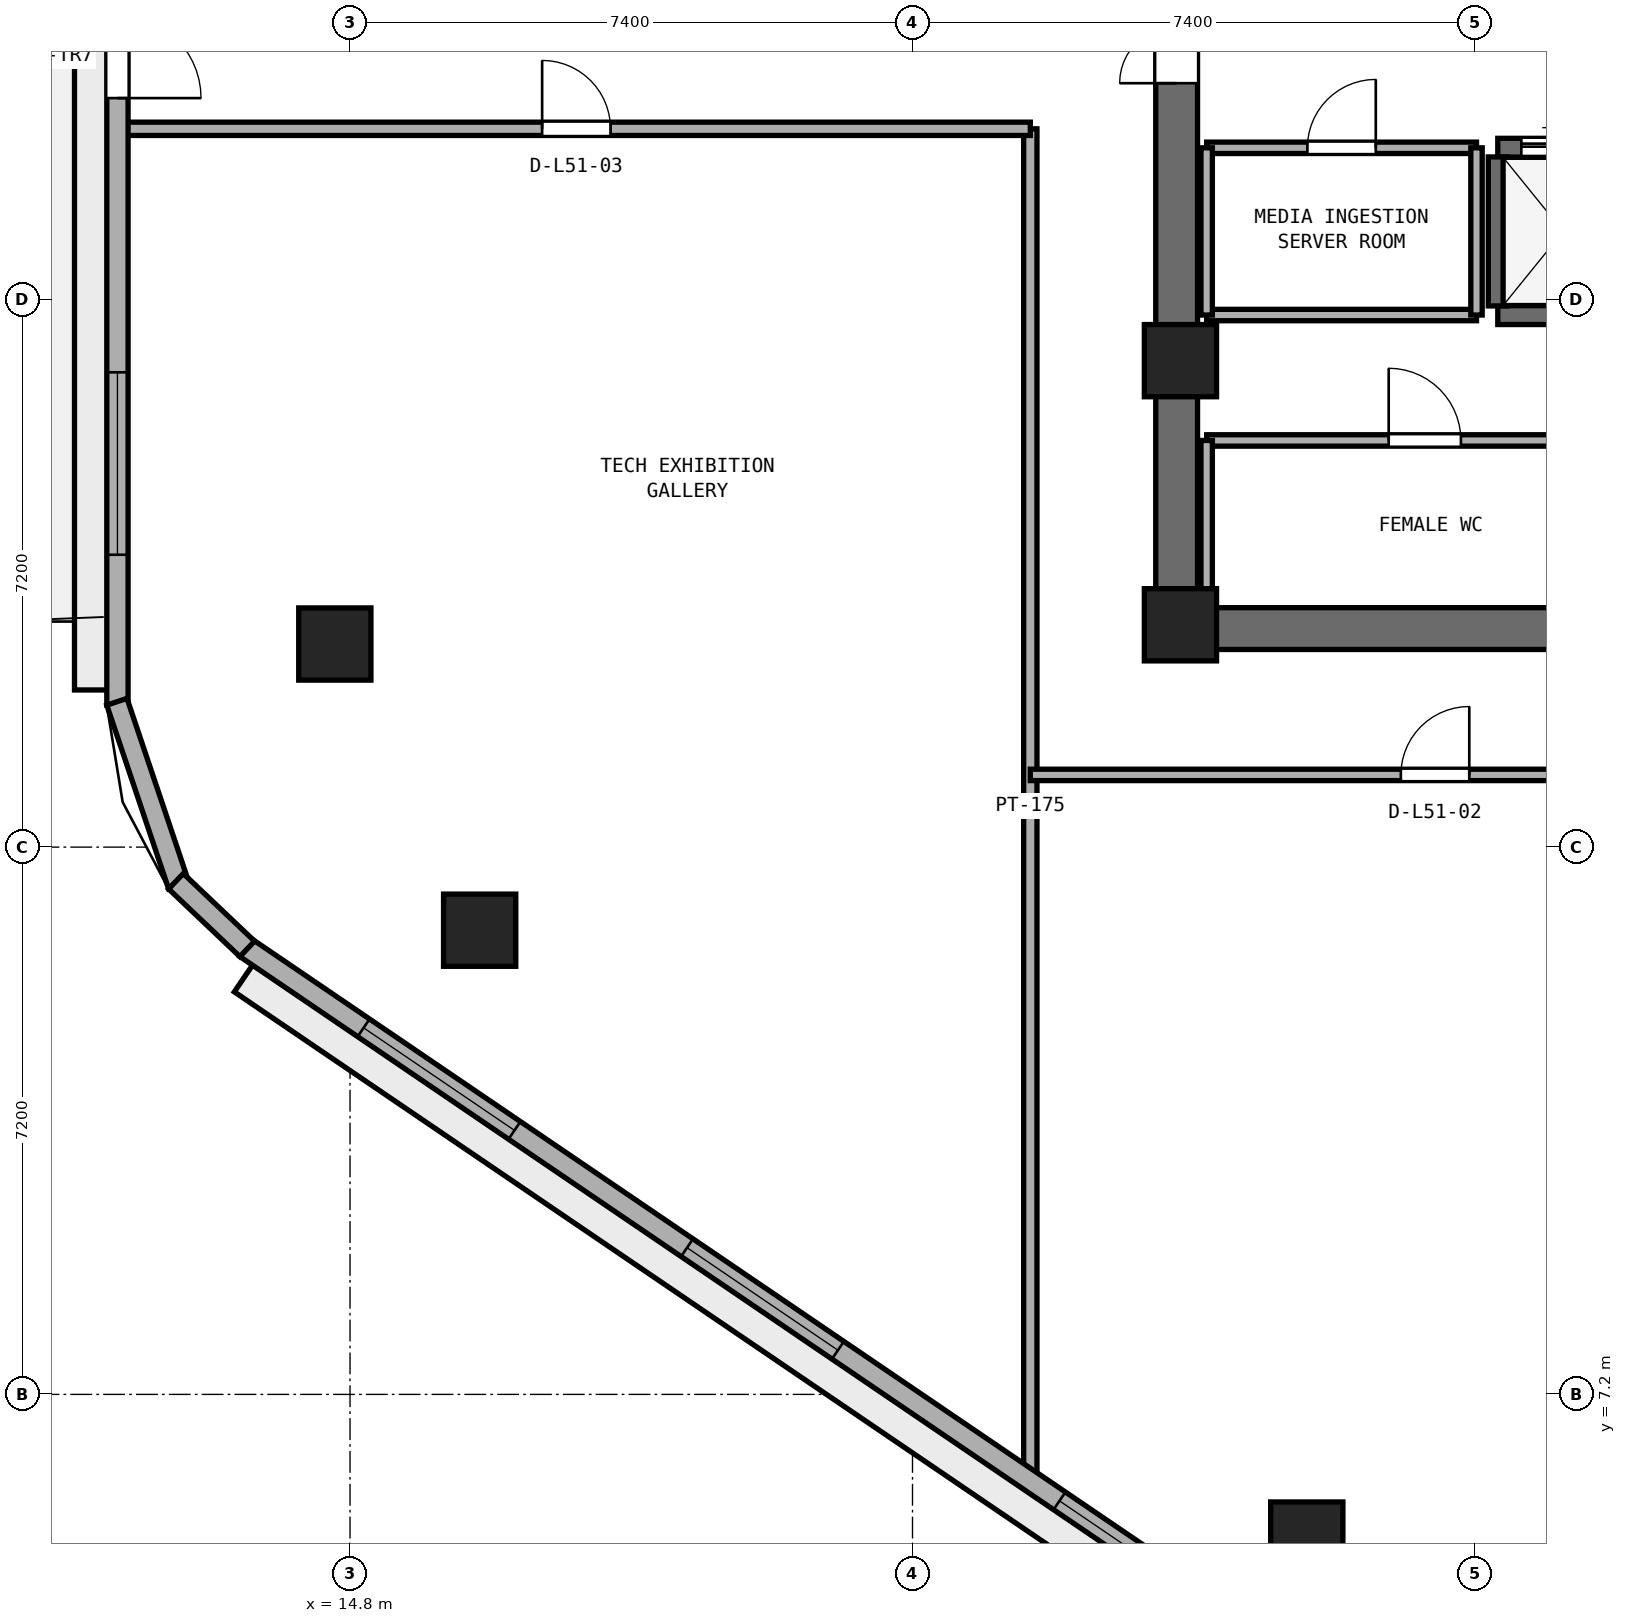
"""IFC4 building model, lengths in metres.
Left out: names, types, materials, properties, quantities, classifications, styles, units other than length and angle.
Written with IfcOpenShell. Run it as: python <this file> out.ifc"""

import sys

from ifc_helpers import new_model, si_unit, direction, frame, frame_2d, origin, origin_2d, place, context, subcontext, project, spatial, rectangle, extrude, element, fill, save


model = new_model("IFC4")
c1 = context("Model", 3, precision=1e-05, world=origin(), true_north=direction((0.0, 1.0)))
c2 = subcontext(c1, "Body", "Model", "MODEL_VIEW")
j1 = project(units=[si_unit("LENGTHUNIT", "METRE"), si_unit("PLANEANGLEUNIT", "RADIAN")], contexts=[c1])
p1 = place(None, origin())
s1 = spatial("IfcSite", under=j1, at=p1, CompositionType="ELEMENT")
p2 = place(p1, origin())
s2 = spatial("IfcBuilding", under=s1, at=p2, CompositionType="ELEMENT")
p3 = place(p2, frame((0.0, 0.0, 201.0)))
s3 = spatial("IfcBuildingStorey", under=s2, at=p3, CompositionType="ELEMENT", Elevation=201.0)
p4 = place(p3, frame((25.4, 17.275, 0.0), z_axis=(0.0, 0.0, 1.0), x_axis=(1.0, 0.0, 0.0)))
e1 = element("IfcWall", 1, at=p4, inside=s3, PredefinedType="SHEAR", context=c2, shape_type="SweptSolid", body=[
    extrude(rectangle(XDim=23.2, YDim=0.55, at=frame_2d((11.6, 0.0))), origin(), (0.0, 0.0, 1.0), 3.54),
])
p5 = place(p3, frame((25.675, 17.55, 0.0), z_axis=(0.0, 0.0, 1.0), x_axis=(0.0, 1.0, 0.0)))
e2 = element("IfcWall", 2, at=p5, inside=s3, PredefinedType="SHEAR", context=c2, shape_type="SweptSolid", body=[
    extrude(rectangle(XDim=15.3, YDim=0.55, at=frame_2d((7.65, 0.0))), origin(), (0.0, 0.0, 1.0), 3.54),
])
p6 = place(p5, frame((6.9, 0.0, 0.0)))
e3 = element("IfcOpeningElement", 3, at=p6, cuts=e2, PredefinedType="OPENING", context=c2, shape_type="SweptSolid", body=[
    extrude(rectangle(XDim=1.5, YDim=2.15, at=frame_2d((0.75, 1.075))), frame((0.0, 0.285, 0.0), z_axis=(0.0, -1.0, 0.0), x_axis=(1.0, 0.0, 0.0)), (0.0, 0.0, 1.0), 0.57),
])
for number, where, z_axis, x_axis in (
    (4, (25.725, 17.325, 0.0), (0.0, 0.0, 1.0), (1.0, 0.0, 0.0)),
    (5, (25.725, 20.8, 0.0), (0.0, 0.0, 1.0), (1.0, 0.0, 0.0)),
):
    element("IfcColumn", number, at=place(p3, frame(where, z_axis=z_axis, x_axis=x_axis)), inside=s3, PredefinedType="PILASTER", context=c2, shape_type="SweptSolid", body=[
        extrude(rectangle(XDim=0.95, YDim=0.95, at=origin_2d()), origin(), (0.0, 0.0, 1.0), 3.8),
    ])
for number, where, z_axis, x_axis in (
    (6, (14.6, 17.072, 0.0), (0.0, 0.0, 1.0), (1.0, 0.0, 0.0)),
    (7, (16.505, 13.307, 0.0), (0.0, 0.0, 1.0), (1.0, 0.0, 0.0)),
    (8, (27.387, 5.31, 0.0), (0.0, 0.0, 1.0), (1.0, 0.0, 0.0)),
):
    element("IfcColumn", number, at=place(p3, frame(where, z_axis=z_axis, x_axis=x_axis)), inside=s3, PredefinedType="COLUMN", context=c2, shape_type="SweptSolid", body=[
        extrude(rectangle(XDim=0.95, YDim=0.95, at=origin_2d()), origin(), (0.0, 0.0, 1.0), 3.8),
    ])
p7 = place(p3, frame((29.9, 21.4, 0.0), z_axis=(0.0, 0.0, 1.0), x_axis=(1.0, 0.0, 0.0)))
e9 = element("IfcWall", 9, at=p7, inside=s3, PredefinedType="SHEAR", context=c2, shape_type="SweptSolid", body=[
    extrude(rectangle(XDim=1.72, YDim=0.25, at=frame_2d((0.86, 0.0))), origin(), (0.0, 0.0, 1.0), 3.54),
])
p8 = place(p3, frame((29.9, 23.6, 0.0), z_axis=(0.0, 0.0, 1.0), x_axis=(1.0, 0.0, 0.0)))
e10 = element("IfcWall", 10, at=p8, inside=s3, PredefinedType="SHEAR", context=c2, shape_type="SweptSolid", body=[
    extrude(rectangle(XDim=1.72, YDim=0.25, at=frame_2d((0.86, 0.0))), origin(), (0.0, 0.0, 1.0), 3.54),
])
p9 = place(p8, frame((0.31, 0.0, 0.0)))
e11 = element("IfcOpeningElement", 11, at=p9, cuts=e10, PredefinedType="OPENING", context=c2, shape_type="SweptSolid", body=[
    extrude(rectangle(XDim=1.1, YDim=2.15, at=frame_2d((0.55, 1.075))), frame((0.0, 0.135, 0.0), z_axis=(0.0, -1.0, 0.0), x_axis=(1.0, 0.0, 0.0)), (0.0, 0.0, 1.0), 0.27),
])
p10 = place(p3, frame((29.9, 21.52, 0.0), z_axis=(0.0, 0.0, 1.0), x_axis=(0.0, 1.0, 0.0)))
e12 = element("IfcWall", 12, at=p10, inside=s3, PredefinedType="SHEAR", context=c2, shape_type="SweptSolid", body=[
    extrude(rectangle(XDim=1.96, YDim=0.25, at=frame_2d((0.98, 0.0))), origin(), (0.0, 0.0, 1.0), 3.54),
])
p11 = place(p3, frame((26.07, 19.75, 0.0), z_axis=(0.0, 0.0, 1.0), x_axis=(1.0, 0.0, 0.0)))
e13 = element("IfcWall", 13, at=p11, inside=s3, PredefinedType="PARTITIONING", context=c2, shape_type="SweptSolid", body=[
    extrude(rectangle(XDim=5.74, YDim=0.15, at=frame_2d((2.87, 0.0))), origin(), (0.0, 0.0, 1.0), 3.54),
])
p12 = place(p11, frame((2.395, 0.0, 0.0)))
e14 = element("IfcOpeningElement", 14, at=p12, cuts=e13, PredefinedType="OPENING", context=c2, shape_type="SweptSolid", body=[
    extrude(rectangle(XDim=0.95, YDim=2.1, at=frame_2d((0.475, 1.05))), frame((0.0, 0.085, 0.0), z_axis=(0.0, -1.0, 0.0), x_axis=(1.0, 0.0, 0.0)), (0.0, 0.0, 1.0), 0.17),
])
p13 = place(p3, frame((26.07, 17.55, 0.0), z_axis=(0.0, 0.0, 1.0), x_axis=(0.0, 1.0, 0.0)))
e15 = element("IfcWall", 15, at=p13, inside=s3, PredefinedType="PARTITIONING", context=c2, shape_type="SweptSolid", body=[
    extrude(rectangle(XDim=2.2, YDim=0.15, at=frame_2d((1.1, 0.0))), origin(), (0.0, 0.0, 1.0), 2.64),
])
p14 = place(p3, frame((26.07, 21.4, 0.0), z_axis=(0.0, 0.0, 1.0), x_axis=(1.0, 0.0, 0.0)))
e16 = element("IfcWall", 16, at=p14, inside=s3, PredefinedType="PARTITIONING", context=c2, shape_type="SweptSolid", body=[
    extrude(rectangle(XDim=3.55, YDim=0.15, at=frame_2d((1.775, 0.0))), origin(), (0.0, 0.0, 1.0), 3.54),
])
p15 = place(p3, frame((26.07, 23.6, 0.0), z_axis=(0.0, 0.0, 1.0), x_axis=(1.0, 0.0, 0.0)))
e17 = element("IfcWall", 17, at=p15, inside=s3, PredefinedType="PARTITIONING", context=c2, shape_type="SweptSolid", body=[
    extrude(rectangle(XDim=3.55, YDim=0.15, at=frame_2d((1.775, 0.0))), origin(), (0.0, 0.0, 1.0), 3.54),
])
p16 = place(p15, frame((1.325, 0.0, 0.0)))
e18 = element("IfcOpeningElement", 18, at=p16, cuts=e17, PredefinedType="OPENING", context=c2, shape_type="SweptSolid", body=[
    extrude(rectangle(XDim=0.9, YDim=2.1, at=frame_2d((0.45, 1.05))), frame((0.0, 0.085, 0.0), z_axis=(0.0, -1.0, 0.0), x_axis=(1.0, 0.0, 0.0)), (0.0, 0.0, 1.0), 0.17),
])
p17 = place(p3, frame((26.07, 21.4, 0.0), z_axis=(0.0, 0.0, 1.0), x_axis=(0.0, 1.0, 0.0)))
e19 = element("IfcWall", 19, at=p17, inside=s3, PredefinedType="PARTITIONING", context=c2, shape_type="SweptSolid", body=[
    extrude(rectangle(XDim=2.2, YDim=0.15, at=frame_2d((1.1, 0.0))), origin(), (0.0, 0.0, 1.0), 2.64),
])
p18 = place(p3, frame((29.62, 21.4, 0.0), z_axis=(0.0, 0.0, 1.0), x_axis=(0.0, 1.0, 0.0)))
e20 = element("IfcWall", 20, at=p18, inside=s3, PredefinedType="PARTITIONING", context=c2, shape_type="SweptSolid", body=[
    extrude(rectangle(XDim=2.2, YDim=0.15, at=frame_2d((1.1, 0.0))), origin(), (0.0, 0.0, 1.0), 3.54),
])
p19 = place(p3, frame((23.75, 6.031, 0.0), z_axis=(0.0, 0.0, 1.0), x_axis=(0.0, 1.0, 0.0)))
e21 = element("IfcWall", 21, at=p19, inside=s3, PredefinedType="PARTITIONING", context=c2, shape_type="SweptSolid", body=[
    extrude(rectangle(XDim=17.819, YDim=0.175, at=frame_2d((8.91, 0.0))), origin(), (0.0, 0.0, 1.0), 3.54),
])
p20 = place(p3, frame((23.75, 15.35, 0.0), z_axis=(0.0, 0.0, 1.0), x_axis=(1.0, 0.0, 0.0)))
e22 = element("IfcWall", 22, at=p20, inside=s3, PredefinedType="PARTITIONING", context=c2, shape_type="SweptSolid", body=[
    extrude(rectangle(XDim=10.65, YDim=0.15, at=frame_2d((5.325, 0.0))), origin(), (0.0, 0.0, 1.0), 3.54),
])
p21 = place(p20, frame((4.875, 0.0, 0.0)))
e23 = element("IfcOpeningElement", 23, at=p21, cuts=e22, PredefinedType="OPENING", context=c2, shape_type="SweptSolid", body=[
    extrude(rectangle(XDim=0.9, YDim=2.1, at=frame_2d((0.45, 1.05))), frame((0.0, 0.085, 0.0), z_axis=(0.0, -1.0, 0.0), x_axis=(1.0, 0.0, 0.0)), (0.0, 0.0, 1.0), 0.17),
])
p22 = place(p3, frame((11.805, 23.85, 0.0), z_axis=(0.0, 0.0, 1.0), x_axis=(1.0, 0.0, 0.0)))
e24 = element("IfcWall", 24, at=p22, inside=s3, PredefinedType="PARTITIONING", context=c2, shape_type="SweptSolid", body=[
    extrude(rectangle(XDim=11.945, YDim=0.175, at=frame_2d((5.973, 0.0))), origin(), (0.0, 0.0, 1.0), 3.54),
])
p23 = place(p22, frame((5.522, 0.0, 0.0)))
e25 = element("IfcOpeningElement", 25, at=p23, cuts=e24, PredefinedType="OPENING", context=c2, shape_type="SweptSolid", body=[
    extrude(rectangle(XDim=0.9, YDim=2.1, at=frame_2d((0.45, 1.05))), frame((0.0, 0.097, 0.0), z_axis=(0.0, -1.0, 0.0), x_axis=(1.0, 0.0, 0.0)), (0.0, 0.0, 1.0), 0.195),
])
p24 = place(p3, frame((11.74, 33.34, 0.0), z_axis=(0.0, 0.0, 1.0), x_axis=(0.0, -1.0, 0.0)))
e26 = element("IfcWall", 26, at=p24, inside=s3, PredefinedType="STANDARD", context=c2, shape_type="SweptSolid", body=[
    extrude(rectangle(XDim=17.073, YDim=0.28, at=frame_2d((8.536, 0.0))), origin(), (0.0, 0.0, 1.0), 3.54),
])
p25 = place(p24, frame((7.986, 0.0, 0.0)))
e27 = element("IfcOpeningElement", 27, at=p25, cuts=e26, PredefinedType="OPENING", context=c2, shape_type="SweptSolid", body=[
    extrude(rectangle(XDim=1.1, YDim=2.2, at=frame_2d((0.55, 1.1))), frame((0.0, 0.15, 0.0), z_axis=(0.0, -1.0, 0.0), x_axis=(1.0, 0.0, 0.0)), (0.0, 0.0, 1.0), 0.3),
])
p26 = place(p24, frame((1.979, 0.0, 0.9)))
e28 = element("IfcOpeningElement", 28, at=p26, cuts=e26, PredefinedType="OPENING", context=c2, shape_type="SweptSolid", body=[
    extrude(rectangle(XDim=2.4, YDim=1.75, at=frame_2d((1.2, 0.875))), frame((0.0, 0.15, 0.0), z_axis=(0.0, -1.0, 0.0), x_axis=(1.0, 0.0, 0.0)), (0.0, 0.0, 1.0), 0.3),
])
p27 = place(p24, frame((12.694, 0.0, 0.9)))
e29 = element("IfcOpeningElement", 29, at=p27, cuts=e26, PredefinedType="OPENING", context=c2, shape_type="SweptSolid", body=[
    extrude(rectangle(XDim=2.4, YDim=1.75, at=frame_2d((1.2, 0.875))), frame((0.0, 0.15, 0.0), z_axis=(0.0, -1.0, 0.0), x_axis=(1.0, 0.0, 0.0)), (0.0, 0.0, 1.0), 0.3),
])
p28 = place(p3, frame((13.43, 13.075, 0.0), z_axis=(0.0, 0.0, 1.0), x_axis=(0.827025402003, -0.562164552815, 0.0)))
e30 = element("IfcWall", 30, at=p28, inside=s3, PredefinedType="STANDARD", context=c2, shape_type="SweptSolid", body=[
    extrude(rectangle(XDim=16.435, YDim=0.28, at=frame_2d((8.218, 0.0))), origin(), (0.0, 0.0, 1.0), 3.54),
])
p29 = place(p28, frame((1.873, 0.0, 0.9)))
e31 = element("IfcOpeningElement", 31, at=p29, cuts=e30, PredefinedType="OPENING", context=c2, shape_type="SweptSolid", body=[
    extrude(rectangle(XDim=2.4, YDim=1.75, at=frame_2d((1.2, 0.875))), frame((0.0, 0.15, 0.0), z_axis=(0.0, -1.0, 0.0), x_axis=(1.0, 0.0, 0.0)), (0.0, 0.0, 1.0), 0.3),
])
p30 = place(p28, frame((7.018, 0.0, 0.9)))
e32 = element("IfcOpeningElement", 32, at=p30, cuts=e30, PredefinedType="OPENING", context=c2, shape_type="SweptSolid", body=[
    extrude(rectangle(XDim=2.4, YDim=1.75, at=frame_2d((1.2, 0.875))), frame((0.0, 0.15, 0.0), z_axis=(0.0, -1.0, 0.0), x_axis=(1.0, 0.0, 0.0)), (0.0, 0.0, 1.0), 0.3),
])
p31 = place(p28, frame((12.943, 0.0, 0.9)))
e33 = element("IfcOpeningElement", 33, at=p31, cuts=e30, PredefinedType="OPENING", context=c2, shape_type="SweptSolid", body=[
    extrude(rectangle(XDim=2.4, YDim=1.75, at=frame_2d((1.2, 0.875))), frame((0.0, 0.15, 0.0), z_axis=(0.0, -1.0, 0.0), x_axis=(1.0, 0.0, 0.0)), (0.0, 0.0, 1.0), 0.3),
])
p32 = place(p3, frame((11.733, 16.312, 0.0), z_axis=(0.0, 0.0, 1.0), x_axis=(0.318924860995, -0.947780002447, 0.0)))
e34 = element("IfcWall", 34, at=p32, inside=s3, PredefinedType="STANDARD", context=c2, shape_type="SweptSolid", body=[
    extrude(rectangle(XDim=2.552, YDim=0.28, at=frame_2d((1.276, 0.0))), origin(), (0.0, 0.0, 1.0), 3.54),
])
p33 = place(p3, frame((12.51, 13.951, 0.0), z_axis=(0.0, 0.0, 1.0), x_axis=(0.725371815671, -0.688357268451, 0.0)))
e35 = element("IfcWall", 35, at=p33, inside=s3, PredefinedType="STANDARD", context=c2, shape_type="SweptSolid", body=[
    extrude(rectangle(XDim=1.293, YDim=0.28, at=frame_2d((0.646, 0.0))), origin(), (0.0, 0.0, 1.0), 3.54),
])
p34 = place(p9, origin())
e36 = element("IfcDoor", 36, at=p34, inside=s3, OperationType="DOUBLE_DOOR_SLIDING", PredefinedType="DOOR", context=c2, shape_type="SweptSolid", body=[
    extrude(rectangle(XDim=1.1, YDim=2.15, at=frame_2d((0.55, 1.075))), frame((0.0, 0.025, 0.0), z_axis=(0.0, -1.0, 0.0), x_axis=(1.0, 0.0, 0.0)), (0.0, 0.0, 1.0), 0.05),
])
fill(e11, e36)
p35 = place(p6, origin())
e37 = element("IfcDoor", 37, at=p35, inside=s3, OperationType="DOUBLE_DOOR_SINGLE_SWING", PredefinedType="DOOR", context=c2, shape_type="SweptSolid", body=[
    extrude(rectangle(XDim=1.5, YDim=2.15, at=frame_2d((0.75, 1.075))), frame((0.0, 0.025, 0.0), z_axis=(0.0, -1.0, 0.0), x_axis=(1.0, 0.0, 0.0)), (0.0, 0.0, 1.0), 0.05),
])
fill(e3, e37)
p36 = place(p12, origin())
e38 = element("IfcDoor", 38, at=p36, inside=s3, OperationType="SINGLE_SWING_LEFT", PredefinedType="DOOR", context=c2, shape_type="SweptSolid", body=[
    extrude(rectangle(XDim=0.95, YDim=2.1, at=frame_2d((0.475, 1.05))), frame((0.0, 0.025, 0.0), z_axis=(0.0, -1.0, 0.0), x_axis=(1.0, 0.0, 0.0)), (0.0, 0.0, 1.0), 0.05),
])
fill(e14, e38)
p37 = place(p16, origin())
e39 = element("IfcDoor", 39, at=p37, inside=s3, OperationType="SINGLE_SWING_RIGHT", PredefinedType="DOOR", context=c2, shape_type="SweptSolid", body=[
    extrude(rectangle(XDim=0.9, YDim=2.1, at=frame_2d((0.45, 1.05))), frame((0.0, 0.025, 0.0), z_axis=(0.0, -1.0, 0.0), x_axis=(1.0, 0.0, 0.0)), (0.0, 0.0, 1.0), 0.05),
])
fill(e18, e39)
p38 = place(p21, origin())
e40 = element("IfcDoor", 40, at=p38, inside=s3, OperationType="SINGLE_SWING_RIGHT", PredefinedType="DOOR", context=c2, shape_type="SweptSolid", body=[
    extrude(rectangle(XDim=0.9, YDim=2.1, at=frame_2d((0.45, 1.05))), frame((0.0, 0.025, 0.0), z_axis=(0.0, -1.0, 0.0), x_axis=(1.0, 0.0, 0.0)), (0.0, 0.0, 1.0), 0.05),
])
fill(e23, e40)
p39 = place(p23, origin())
e41 = element("IfcDoor", 41, at=p39, inside=s3, OperationType="SINGLE_SWING_LEFT", PredefinedType="DOOR", context=c2, shape_type="SweptSolid", body=[
    extrude(rectangle(XDim=0.9, YDim=2.1, at=frame_2d((0.45, 1.05))), frame((0.0, 0.025, 0.0), z_axis=(0.0, -1.0, 0.0), x_axis=(1.0, 0.0, 0.0)), (0.0, 0.0, 1.0), 0.05),
])
fill(e25, e41)
p40 = place(p25, origin())
e42 = element("IfcDoor", 42, at=p40, inside=s3, OperationType="SINGLE_SWING_RIGHT", PredefinedType="DOOR", context=c2, shape_type="SweptSolid", body=[
    extrude(rectangle(XDim=1.1, YDim=2.2, at=frame_2d((0.55, 1.1))), frame((0.0, 0.025, 0.0), z_axis=(0.0, -1.0, 0.0), x_axis=(1.0, 0.0, 0.0)), (0.0, 0.0, 1.0), 0.05),
])
fill(e27, e42)
p41 = place(p27, origin())
e43 = element("IfcWindow", 43, at=p41, inside=s3, PartitioningType="SINGLE_PANEL", PredefinedType="WINDOW", context=c2, shape_type="SweptSolid", body=[
    extrude(rectangle(XDim=2.4, YDim=1.75, at=frame_2d((1.2, 0.875))), frame((0.0, 0.03, 0.0), z_axis=(0.0, -1.0, 0.0), x_axis=(1.0, 0.0, 0.0)), (0.0, 0.0, 1.0), 0.06),
])
fill(e29, e43)
p42 = place(p29, origin())
e44 = element("IfcWindow", 44, at=p42, inside=s3, PartitioningType="SINGLE_PANEL", PredefinedType="WINDOW", context=c2, shape_type="SweptSolid", body=[
    extrude(rectangle(XDim=2.4, YDim=1.75, at=frame_2d((1.2, 0.875))), frame((0.0, 0.03, 0.0), z_axis=(0.0, -1.0, 0.0), x_axis=(1.0, 0.0, 0.0)), (0.0, 0.0, 1.0), 0.06),
])
fill(e31, e44)
p43 = place(p30, origin())
e45 = element("IfcWindow", 45, at=p43, inside=s3, PartitioningType="SINGLE_PANEL", PredefinedType="WINDOW", context=c2, shape_type="SweptSolid", body=[
    extrude(rectangle(XDim=2.4, YDim=1.75, at=frame_2d((1.2, 0.875))), frame((0.0, 0.03, 0.0), z_axis=(0.0, -1.0, 0.0), x_axis=(1.0, 0.0, 0.0)), (0.0, 0.0, 1.0), 0.06),
])
fill(e32, e45)
p44 = place(p31, origin())
e46 = element("IfcWindow", 46, at=p44, inside=s3, PartitioningType="SINGLE_PANEL", PredefinedType="WINDOW", context=c2, shape_type="SweptSolid", body=[
    extrude(rectangle(XDim=2.4, YDim=1.75, at=frame_2d((1.2, 0.875))), frame((0.0, 0.03, 0.0), z_axis=(0.0, -1.0, 0.0), x_axis=(1.0, 0.0, 0.0)), (0.0, 0.0, 1.0), 0.06),
])
fill(e33, e46)
save(model, sys.argv[1])
